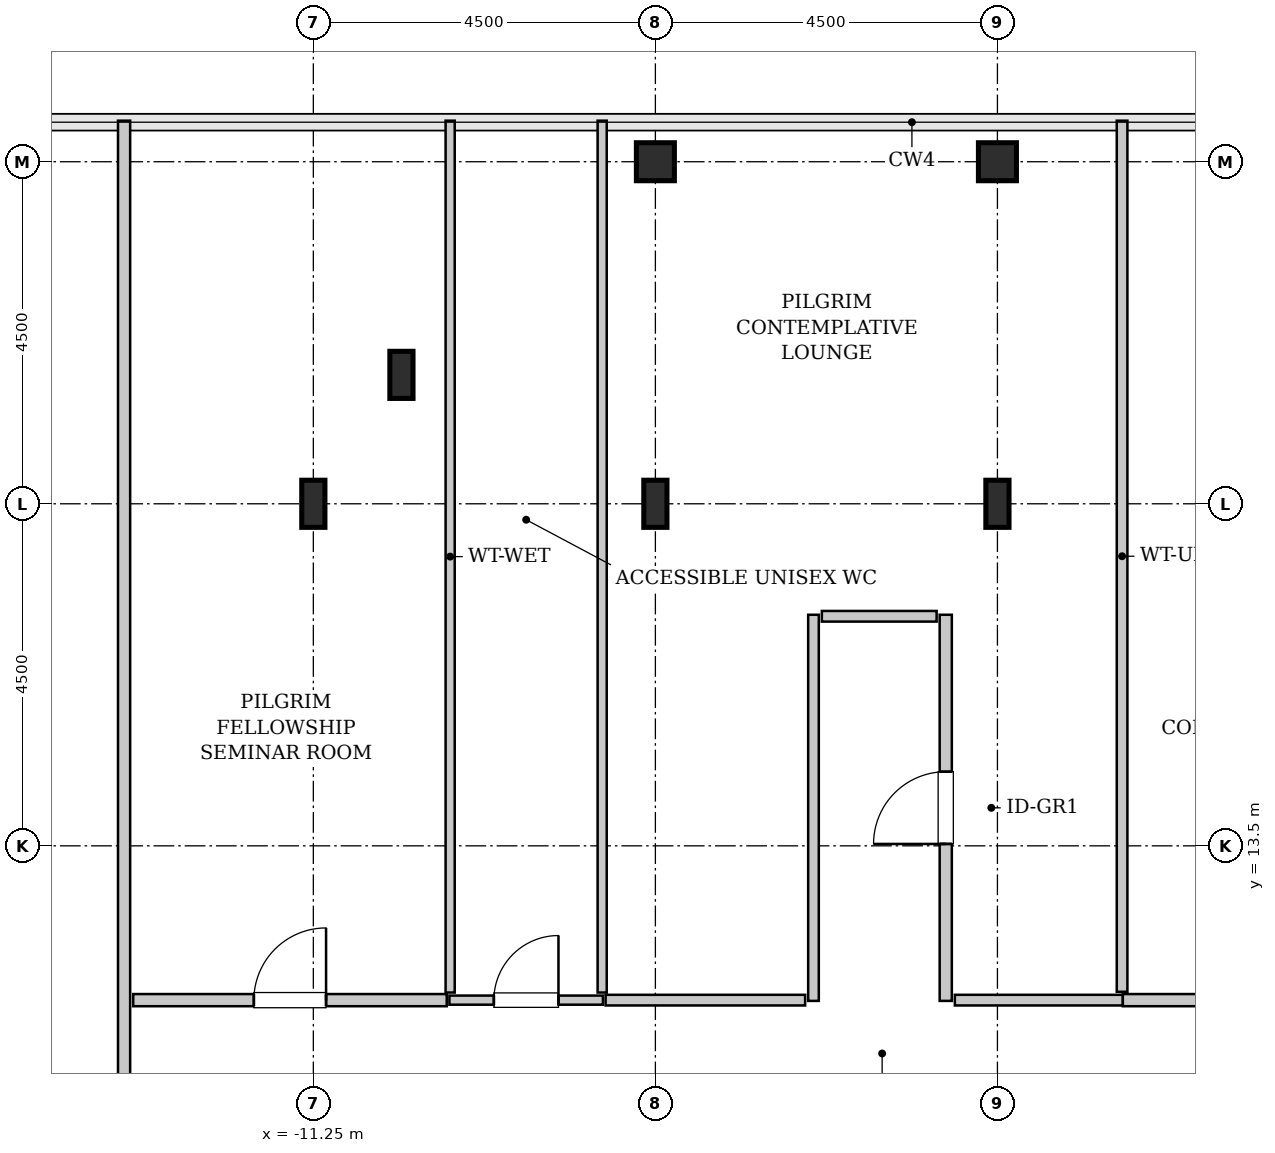
"""IFC4 building model, lengths in metres.
Left out: names, types, materials, properties, quantities, classifications, styles, units other than length and angle.
Written with IfcOpenShell. Run it as: python <this file> out.ifc"""

import sys

from ifc_helpers import new_model, si_unit, direction, frame, frame_2d, origin, origin_2d, place, context, subcontext, project, spatial, rectangle, hollow_rectangle, i_section, extrude, source, transform, mapped, element, fill, save


model = new_model("IFC4")
c1 = context("Model", 3, precision=1e-05, world=origin(), true_north=direction((0.0, 1.0)))
c2 = subcontext(c1, "Body", "Model", "MODEL_VIEW")
j1 = project(units=[si_unit("LENGTHUNIT", "METRE"), si_unit("PLANEANGLEUNIT", "RADIAN")], contexts=[c1])
p1 = place(None, origin())
s1 = spatial("IfcSite", under=j1, at=p1, CompositionType="ELEMENT")
p2 = place(p1, origin())
s2 = spatial("IfcBuilding", under=s1, at=p2, CompositionType="ELEMENT")
p3 = place(p2, frame((0.0, 0.0, 341.4)))
s3 = spatial("IfcBuildingStorey", under=s2, at=p3, CompositionType="ELEMENT", Elevation=341.4)
m1 = source(origin(), c2, "Body", "SweptSolid", [
    extrude(i_section(OverallWidth=0.305, OverallDepth=0.62, WebThickness=0.021, FlangeThickness=0.04, FilletRadius=0.027, at=origin_2d()), origin(), (0.0, 0.0, 1.0), 3.8),
])
for number, where, z_axis, x_axis in (
    (1, (-11.25, 18.0, 0.0), (0.0, 0.0, 1.0), (1.0, 0.0, 0.0)),
    (2, (-10.091, 19.696, 0.0), (0.0, 0.0, 1.0), (1.0, 0.0, 0.0)),
    (3, (-6.75, 18.0, 0.0), (0.0, 0.0, 1.0), (1.0, 0.0, 0.0)),
):
    element("IfcColumn", number, at=place(p3, frame(where, z_axis=z_axis, x_axis=x_axis)), inside=s3, PredefinedType="COLUMN", context=c2, shape_type="MappedRepresentation", body=[
        mapped(m1, transform((0.0, 0.0, 0.0), x_axis=(1.0, 0.0, 0.0), y_axis=(0.0, 1.0, 0.0), z_axis=(0.0, 0.0, 1.0), scale=1.0)),
    ])
m2 = source(origin(), c2, "Body", "SweptSolid", [
    extrude(hollow_rectangle(XDim=0.5, YDim=0.5, WallThickness=0.025, InnerFilletRadius=0.025, OuterFilletRadius=0.05, at=origin_2d()), origin(), (0.0, 0.0, 1.0), 3.8),
])
p4 = place(p3, frame((-6.75, 22.5, 0.0), z_axis=(0.0, 0.0, 1.0), x_axis=(1.0, 0.0, 0.0)))
e4 = element("IfcColumn", 4, at=p4, inside=s3, PredefinedType="COLUMN", context=c2, shape_type="MappedRepresentation", body=[
    mapped(m2, transform((0.0, 0.0, 0.0), x_axis=(1.0, 0.0, 0.0), y_axis=(0.0, 1.0, 0.0), z_axis=(0.0, 0.0, 1.0), scale=1.0)),
])
p5 = place(p3, frame((-2.25, 18.0, 0.0), z_axis=(0.0, 0.0, 1.0), x_axis=(1.0, 0.0, 0.0)))
e5 = element("IfcColumn", 5, at=p5, inside=s3, PredefinedType="COLUMN", context=c2, shape_type="MappedRepresentation", body=[
    mapped(m1, transform((0.0, 0.0, 0.0), x_axis=(1.0, 0.0, 0.0), y_axis=(0.0, 1.0, 0.0), z_axis=(0.0, 0.0, 1.0), scale=1.0)),
])
p6 = place(p3, frame((-2.25, 22.5, 0.0), z_axis=(0.0, 0.0, 1.0), x_axis=(1.0, 0.0, 0.0)))
e6 = element("IfcColumn", 6, at=p6, inside=s3, PredefinedType="COLUMN", context=c2, shape_type="MappedRepresentation", body=[
    mapped(m2, transform((0.0, 0.0, 0.0), x_axis=(1.0, 0.0, 0.0), y_axis=(0.0, 1.0, 0.0), z_axis=(0.0, 0.0, 1.0), scale=1.0)),
])
m3 = source(origin(), c2, "Body", "SweptSolid", [
    extrude(rectangle(XDim=2.02, YDim=0.12, at=frame_2d((1.01, 0.0))), origin(), (0.0, 0.0, 1.0), 3.535),
])
p7 = place(p3, frame((-9.46, 11.47, 0.0), z_axis=(0.0, 0.0, 1.0), x_axis=(1.0, 0.0, 0.0)))
e7 = element("IfcWall", 7, at=p7, inside=s3, PredefinedType="PLUMBINGWALL", context=c2, shape_type="MappedRepresentation", body=[
    mapped(m3, transform((0.0, 0.0, 0.0), x_axis=(1.0, 0.0, 0.0), y_axis=(0.0, 1.0, 0.0), z_axis=(0.0, 0.0, 1.0), scale=1.0)),
])
p8 = place(p7, frame((0.585, 0.0, 0.0)))
e8 = element("IfcOpeningElement", 8, at=p8, cuts=e7, PredefinedType="OPENING", context=c2, shape_type="SweptSolid", body=[
    extrude(rectangle(XDim=0.85, YDim=2.1, at=frame_2d((0.425, 1.05))), frame((0.0, 0.07, 0.0), z_axis=(0.0, -1.0, 0.0), x_axis=(1.0, 0.0, 0.0)), (0.0, 0.0, 1.0), 0.14),
])
m4 = source(origin(), c2, "Body", "SweptSolid", [
    extrude(rectangle(XDim=11.47, YDim=0.12, at=frame_2d((5.735, 0.0))), origin(), (0.0, 0.0, 1.0), 3.535),
])
for number, where, z_axis, x_axis in (
    (9, (-9.45, 11.57, 0.0), (0.0, 0.0, 1.0), (0.0, 1.0, 0.0)),
    (10, (-7.45, 11.57, 0.0), (0.0, 0.0, 1.0), (0.0, 1.0, 0.0)),
):
    element("IfcWall", number, at=place(p3, frame(where, z_axis=z_axis, x_axis=x_axis)), inside=s3, PredefinedType="PLUMBINGWALL", context=c2, shape_type="MappedRepresentation", body=[
        mapped(m4, transform((0.0, 0.0, 0.0), x_axis=(1.0, 0.0, 0.0), y_axis=(0.0, 1.0, 0.0), z_axis=(0.0, 0.0, 1.0), scale=1.0)),
    ])
m5 = source(origin(), c2, "Body", "SweptSolid", [
    extrude(rectangle(XDim=14.545, YDim=0.16, at=frame_2d((7.272, 0.0))), origin(), (0.0, 0.0, 1.0), 3.535),
])
p9 = place(p3, frame((-13.74, 8.495, 0.0), z_axis=(0.0, 0.0, 1.0), x_axis=(0.0, 1.0, 0.0)))
e11 = element("IfcWall", 11, at=p9, inside=s3, PredefinedType="PARTITIONING", context=c2, shape_type="MappedRepresentation", body=[
    mapped(m5, transform((0.0, 0.0, 0.0), x_axis=(1.0, 0.0, 0.0), y_axis=(0.0, 1.0, 0.0), z_axis=(0.0, 0.0, 1.0), scale=1.0)),
])
p10 = place(p9, frame((1.032, 0.0, 0.0)))
e12 = element("IfcOpeningElement", 12, at=p10, cuts=e11, PredefinedType="OPENING", context=c2, shape_type="SweptSolid", body=[
    extrude(rectangle(XDim=0.95, YDim=2.1, at=frame_2d((0.475, 1.05))), frame((0.0, 0.09, 0.0), z_axis=(0.0, -1.0, 0.0), x_axis=(1.0, 0.0, 0.0)), (0.0, 0.0, 1.0), 0.18),
])
m6 = source(origin(), c2, "Body", "SweptSolid", [
    extrude(rectangle(XDim=4.125, YDim=0.16, at=frame_2d((2.062, 0.0))), origin(), (0.0, 0.0, 1.0), 3.535),
])
p11 = place(p3, frame((-13.62, 11.47, 0.0), z_axis=(0.0, 0.0, 1.0), x_axis=(1.0, 0.0, 0.0)))
e13 = element("IfcWall", 13, at=p11, inside=s3, PredefinedType="PARTITIONING", context=c2, shape_type="MappedRepresentation", body=[
    mapped(m6, transform((0.0, 0.0, 0.0), x_axis=(1.0, 0.0, 0.0), y_axis=(0.0, 1.0, 0.0), z_axis=(0.0, 0.0, 1.0), scale=1.0)),
])
p12 = place(p11, frame((1.587, 0.0, 0.0)))
e14 = element("IfcOpeningElement", 14, at=p12, cuts=e13, PredefinedType="OPENING", context=c2, shape_type="SweptSolid", body=[
    extrude(rectangle(XDim=0.95, YDim=2.1, at=frame_2d((0.475, 1.05))), frame((0.0, 0.09, 0.0), z_axis=(0.0, -1.0, 0.0), x_axis=(1.0, 0.0, 0.0)), (0.0, 0.0, 1.0), 0.18),
])
m7 = source(origin(), c2, "Body", "SweptSolid", [
    extrude(rectangle(XDim=5.08, YDim=0.16, at=frame_2d((2.54, 0.0))), origin(), (0.0, 0.0, 1.0), 3.535),
])
p13 = place(p3, frame((-2.93, 11.46, 0.0), z_axis=(0.0, 0.0, 1.0), x_axis=(0.0, 1.0, 0.0)))
e15 = element("IfcWall", 15, at=p13, inside=s3, PredefinedType="PARTITIONING", context=c2, shape_type="MappedRepresentation", body=[
    mapped(m7, transform((0.0, 0.0, 0.0), x_axis=(1.0, 0.0, 0.0), y_axis=(0.0, 1.0, 0.0), z_axis=(0.0, 0.0, 1.0), scale=1.0)),
])
p14 = place(p13, frame((2.065, 0.0, 0.0)))
e16 = element("IfcOpeningElement", 16, at=p14, cuts=e15, PredefinedType="OPENING", context=c2, shape_type="SweptSolid", body=[
    extrude(rectangle(XDim=0.95, YDim=2.1, at=frame_2d((0.475, 1.05))), frame((0.0, 0.09, 0.0), z_axis=(0.0, -1.0, 0.0), x_axis=(1.0, 0.0, 0.0)), (0.0, 0.0, 1.0), 0.18),
])
m8 = source(origin(), c2, "Body", "SweptSolid", [
    extrude(rectangle(XDim=5.08, YDim=0.14, at=frame_2d((2.54, 0.0))), origin(), (0.0, 0.0, 1.0), 3.535),
])
p15 = place(p3, frame((-4.67, 11.46, 0.0), z_axis=(0.0, 0.0, 1.0), x_axis=(0.0, 1.0, 0.0)))
e17 = element("IfcWall", 17, at=p15, inside=s3, PredefinedType="PARTITIONING", context=c2, shape_type="MappedRepresentation", body=[
    mapped(m8, transform((0.0, 0.0, 0.0), x_axis=(1.0, 0.0, 0.0), y_axis=(0.0, 1.0, 0.0), z_axis=(0.0, 0.0, 1.0), scale=1.0)),
])
m9 = source(origin(), c2, "Body", "SweptSolid", [
    extrude(rectangle(XDim=2.625, YDim=0.14, at=frame_2d((1.312, 0.0))), origin(), (0.0, 0.0, 1.0), 3.535),
])
p16 = place(p3, frame((-7.405, 11.47, 0.0), z_axis=(0.0, 0.0, 1.0), x_axis=(1.0, 0.0, 0.0)))
e18 = element("IfcWall", 18, at=p16, inside=s3, PredefinedType="PARTITIONING", context=c2, shape_type="MappedRepresentation", body=[
    mapped(m9, transform((0.0, 0.0, 0.0), x_axis=(1.0, 0.0, 0.0), y_axis=(0.0, 1.0, 0.0), z_axis=(0.0, 0.0, 1.0), scale=1.0)),
])
m10 = source(origin(), c2, "Body", "SweptSolid", [
    extrude(rectangle(XDim=2.21, YDim=0.14, at=frame_2d((1.105, 0.0))), origin(), (0.0, 0.0, 1.0), 3.535),
])
p17 = place(p3, frame((-2.81, 11.47, 0.0), z_axis=(0.0, 0.0, 1.0), x_axis=(1.0, 0.0, 0.0)))
e19 = element("IfcWall", 19, at=p17, inside=s3, PredefinedType="PARTITIONING", context=c2, shape_type="MappedRepresentation", body=[
    mapped(m10, transform((0.0, 0.0, 0.0), x_axis=(1.0, 0.0, 0.0), y_axis=(0.0, 1.0, 0.0), z_axis=(0.0, 0.0, 1.0), scale=1.0)),
])
m11 = source(origin(), c2, "Body", "SweptSolid", [
    extrude(rectangle(XDim=1.51, YDim=0.14, at=frame_2d((0.755, 0.0))), origin(), (0.0, 0.0, 1.0), 3.535),
])
p18 = place(p3, frame((-4.56, 16.52, 0.0), z_axis=(0.0, 0.0, 1.0), x_axis=(1.0, 0.0, 0.0)))
e20 = element("IfcWall", 20, at=p18, inside=s3, PredefinedType="PARTITIONING", context=c2, shape_type="MappedRepresentation", body=[
    mapped(m11, transform((0.0, 0.0, 0.0), x_axis=(1.0, 0.0, 0.0), y_axis=(0.0, 1.0, 0.0), z_axis=(0.0, 0.0, 1.0), scale=1.0)),
])
m12 = source(origin(), c2, "Body", "SweptSolid", [
    extrude(rectangle(XDim=11.46, YDim=0.14, at=frame_2d((5.73, 0.0))), origin(), (0.0, 0.0, 1.0), 3.535),
])
p19 = place(p3, frame((-0.61, 11.58, 0.0), z_axis=(0.0, 0.0, 1.0), x_axis=(0.0, 1.0, 0.0)))
e21 = element("IfcWall", 21, at=p19, inside=s3, PredefinedType="PARTITIONING", context=c2, shape_type="MappedRepresentation", body=[
    mapped(m12, transform((0.0, 0.0, 0.0), x_axis=(1.0, 0.0, 0.0), y_axis=(0.0, 1.0, 0.0), z_axis=(0.0, 0.0, 1.0), scale=1.0)),
])
m13 = source(origin(), c2, "Body", "SweptSolid", [
    extrude(rectangle(XDim=3.403, YDim=0.16, at=frame_2d((1.701, 0.0))), origin(), (0.0, 0.0, 1.0), 3.535),
])
p20 = place(p3, frame((-0.6, 11.47, 0.0), z_axis=(0.0, 0.0, 1.0), x_axis=(1.0, 0.0, 0.0)))
e22 = element("IfcWall", 22, at=p20, inside=s3, PredefinedType="PARTITIONING", context=c2, shape_type="MappedRepresentation", body=[
    mapped(m13, transform((0.0, 0.0, 0.0), x_axis=(1.0, 0.0, 0.0), y_axis=(0.0, 1.0, 0.0), z_axis=(0.0, 0.0, 1.0), scale=1.0)),
])
p21 = place(p20, frame((1.226, 0.0, 0.0)))
e23 = element("IfcOpeningElement", 23, at=p21, cuts=e22, PredefinedType="OPENING", context=c2, shape_type="SweptSolid", body=[
    extrude(rectangle(XDim=0.95, YDim=2.1, at=frame_2d((0.475, 1.05))), frame((0.0, 0.09, 0.0), z_axis=(0.0, -1.0, 0.0), x_axis=(1.0, 0.0, 0.0)), (0.0, 0.0, 1.0), 0.18),
])
m14 = source(origin(), c2, "Body", "SweptSolid", [
    extrude(rectangle(XDim=0.85, YDim=2.1, at=frame_2d((0.425, 1.05))), frame((0.0, 0.025, 0.0), z_axis=(0.0, -1.0, 0.0), x_axis=(1.0, 0.0, 0.0)), (0.0, 0.0, 1.0), 0.05),
])
p22 = place(p8, origin())
e24 = element("IfcDoor", 24, at=p22, inside=s3, OperationType="SINGLE_SWING_RIGHT", PredefinedType="DOOR", context=c2, shape_type="MappedRepresentation", body=[
    mapped(m14, transform((0.0, 0.0, 0.0), x_axis=(1.0, 0.0, 0.0), y_axis=(0.0, 1.0, 0.0), z_axis=(0.0, 0.0, 1.0), scale=1.0)),
])
fill(e8, e24)
m15 = source(origin(), c2, "Body", "SweptSolid", [
    extrude(rectangle(XDim=0.95, YDim=2.1, at=frame_2d((0.475, 1.05))), frame((0.0, 0.025, 0.0), z_axis=(0.0, -1.0, 0.0), x_axis=(1.0, 0.0, 0.0)), (0.0, 0.0, 1.0), 0.05),
])
p23 = place(p12, origin())
e25 = element("IfcDoor", 25, at=p23, inside=s3, OperationType="SINGLE_SWING_RIGHT", PredefinedType="DOOR", context=c2, shape_type="MappedRepresentation", body=[
    mapped(m15, transform((0.0, 0.0, 0.0), x_axis=(1.0, 0.0, 0.0), y_axis=(0.0, 1.0, 0.0), z_axis=(0.0, 0.0, 1.0), scale=1.0)),
])
fill(e14, e25)
p24 = place(p14, origin())
e26 = element("IfcDoor", 26, at=p24, inside=s3, OperationType="SINGLE_SWING_LEFT", PredefinedType="DOOR", context=c2, shape_type="MappedRepresentation", body=[
    mapped(m15, transform((0.0, 0.0, 0.0), x_axis=(1.0, 0.0, 0.0), y_axis=(0.0, 1.0, 0.0), z_axis=(0.0, 0.0, 1.0), scale=1.0)),
])
fill(e16, e26)
save(model, sys.argv[1])
